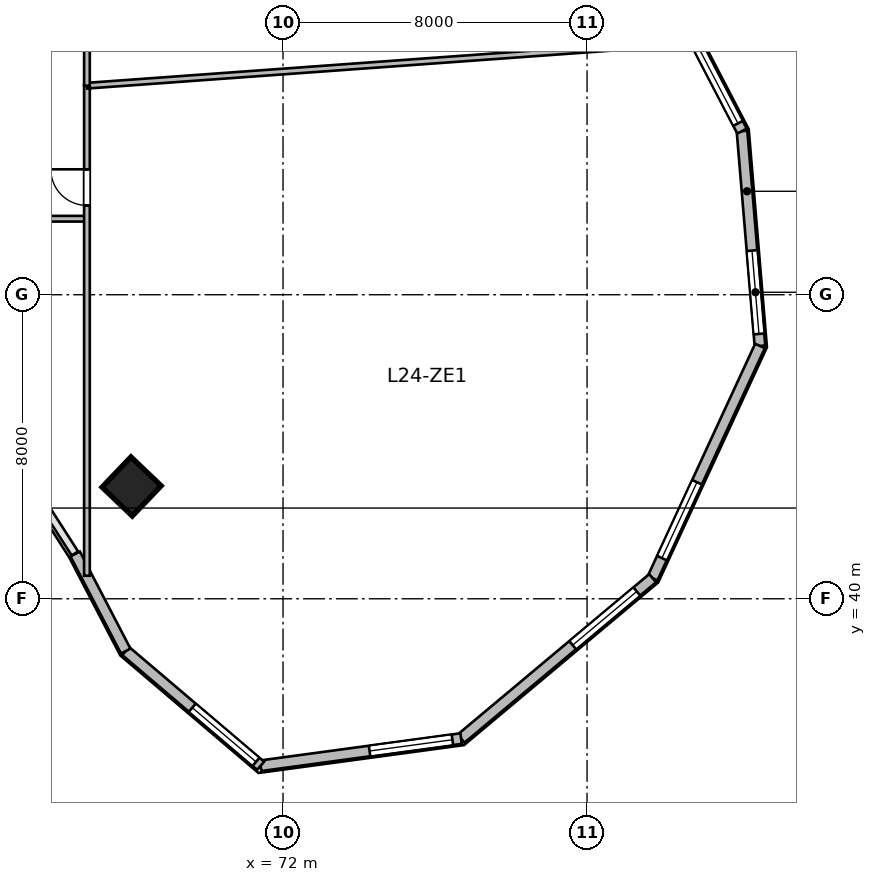
"""IFC4 building model, lengths in metres.
Left out: names, types, materials, properties, quantities, classifications, styles, units other than length and angle.
Written with IfcOpenShell. Run it as: python <this file> out.ifc"""

import sys

from ifc_helpers import new_model, si_unit, direction, frame, frame_2d, origin, origin_2d, place, context, subcontext, project, spatial, rectangle, extrude, source, transform, mapped, element, fill, save


model = new_model("IFC4")
c1 = context("Model", 3, precision=1e-05, world=origin(), true_north=direction((0.0, 1.0)))
c2 = subcontext(c1, "Body", "Model", "MODEL_VIEW")
j1 = project(units=[si_unit("LENGTHUNIT", "METRE"), si_unit("PLANEANGLEUNIT", "RADIAN")], contexts=[c1])
p1 = place(None, origin())
s1 = spatial("IfcSite", under=j1, at=p1, CompositionType="ELEMENT")
p2 = place(p1, origin())
s2 = spatial("IfcBuilding", under=s1, at=p2, CompositionType="ELEMENT")
p3 = place(p2, frame((0.0, 0.0, 103.8)))
s3 = spatial("IfcBuildingStorey", under=s2, at=p3, CompositionType="ELEMENT", Elevation=103.8)
m1 = source(origin(), c2, "Body", "SweptSolid", [
    extrude(rectangle(XDim=1.1, YDim=1.1, at=origin_2d()), origin(), (0.0, 0.0, 1.0), 3.9),
])
p4 = place(p3, frame((68.015, 42.955, 0.0), z_axis=(0.0, 0.0, 1.0), x_axis=(0.690756218984, 0.723087716626, 0.0)))
e1 = element("IfcColumn", 1, at=p4, inside=s3, PredefinedType="COLUMN", context=c2, shape_type="MappedRepresentation", body=[
    mapped(m1, transform((0.0, 0.0, 0.0), scale=1.0)),
])
m2 = source(origin(), c2, "Body", "SweptSolid", [
    extrude(rectangle(XDim=5.674, YDim=0.28, at=frame_2d((2.837, 0.0))), origin(), (0.0, 0.0, 1.0), 3.65),
])
p5 = place(p3, frame((84.078, 52.305, 0.0), z_axis=(0.0, 0.0, 1.0), x_axis=(0.083309007867, -0.996523762491, 0.0)))
e2 = element("IfcWall", 2, at=p5, inside=s3, PredefinedType="SOLIDWALL", context=c2, shape_type="MappedRepresentation", body=[
    mapped(m2, transform((0.0, 0.0, 0.0), scale=1.0)),
])
p6 = place(p5, frame((3.155, 0.0, 0.95)))
e3 = element("IfcOpeningElement", 3, at=p6, cuts=e2, PredefinedType="OPENING", context=c2, shape_type="SweptSolid", body=[
    extrude(rectangle(XDim=2.2, YDim=2.1, at=frame_2d((1.1, 1.05))), frame((0.0, 0.15, 0.0), z_axis=(0.0, -1.0, 0.0), x_axis=(1.0, 0.0, 0.0)), (0.0, 0.0, 1.0), 0.3),
])
m3 = source(origin(), c2, "Body", "SweptSolid", [
    extrude(rectangle(XDim=6.732, YDim=0.28, at=frame_2d((3.366, 0.0))), origin(), (0.0, 0.0, 1.0), 3.65),
])
p7 = place(p3, frame((84.55, 46.652, 0.0), z_axis=(0.0, 0.0, 1.0), x_axis=(-0.419644552709, -0.907688520023, 0.0)))
e4 = element("IfcWall", 4, at=p7, inside=s3, PredefinedType="SOLIDWALL", context=c2, shape_type="MappedRepresentation", body=[
    mapped(m3, transform((0.0, 0.0, 0.0), scale=1.0)),
])
p8 = place(p7, frame((3.949, 0.0, 0.95)))
e5 = element("IfcOpeningElement", 5, at=p8, cuts=e4, PredefinedType="OPENING", context=c2, shape_type="SweptSolid", body=[
    extrude(rectangle(XDim=2.2, YDim=2.1, at=frame_2d((1.1, 1.05))), frame((0.0, 0.15, 0.0), z_axis=(0.0, -1.0, 0.0), x_axis=(1.0, 0.0, 0.0)), (0.0, 0.0, 1.0), 0.3),
])
m4 = source(origin(), c2, "Body", "SweptSolid", [
    extrude(rectangle(XDim=6.573, YDim=0.28, at=frame_2d((3.287, 0.0))), origin(), (0.0, 0.0, 1.0), 3.65),
])
p9 = place(p3, frame((81.725, 40.541, 0.0), z_axis=(0.0, 0.0, 1.0), x_axis=(-0.766715154163, -0.641987439423, 0.0)))
e6 = element("IfcWall", 6, at=p9, inside=s3, PredefinedType="SOLIDWALL", context=c2, shape_type="MappedRepresentation", body=[
    mapped(m4, transform((0.0, 0.0, 0.0), scale=1.0)),
])
p10 = place(p9, frame((0.543, 0.0, 0.95)))
e7 = element("IfcOpeningElement", 7, at=p10, cuts=e6, PredefinedType="OPENING", context=c2, shape_type="SweptSolid", body=[
    extrude(rectangle(XDim=2.2, YDim=2.1, at=frame_2d((1.1, 1.05))), frame((0.0, 0.15, 0.0), z_axis=(0.0, -1.0, 0.0), x_axis=(1.0, 0.0, 0.0)), (0.0, 0.0, 1.0), 0.3),
])
m5 = source(origin(), c2, "Body", "SweptSolid", [
    extrude(rectangle(XDim=5.324, YDim=0.28, at=frame_2d((2.662, 0.0))), origin(), (0.0, 0.0, 1.0), 3.65),
])
p11 = place(p3, frame((76.686, 36.322, 0.0), z_axis=(0.0, 0.0, 1.0), x_axis=(-0.990931467223, -0.134368252451, 0.0)))
e8 = element("IfcWall", 8, at=p11, inside=s3, PredefinedType="SOLIDWALL", context=c2, shape_type="MappedRepresentation", body=[
    mapped(m5, transform((0.0, 0.0, 0.0), scale=1.0)),
])
p12 = place(p11, frame((0.231, 0.0, 0.95)))
e9 = element("IfcOpeningElement", 9, at=p12, cuts=e8, PredefinedType="OPENING", context=c2, shape_type="SweptSolid", body=[
    extrude(rectangle(XDim=2.2, YDim=2.1, at=frame_2d((1.1, 1.05))), frame((0.0, 0.15, 0.0), z_axis=(0.0, -1.0, 0.0), x_axis=(1.0, 0.0, 0.0)), (0.0, 0.0, 1.0), 0.3),
])
m6 = source(origin(), c2, "Body", "SweptSolid", [
    extrude(rectangle(XDim=4.659, YDim=0.28, at=frame_2d((2.33, 0.0))), origin(), (0.0, 0.0, 1.0), 3.65),
])
p13 = place(p3, frame((71.41, 35.606, 0.0), z_axis=(0.0, 0.0, 1.0), x_axis=(-0.761913458795, 0.647678841176, 0.0)))
e10 = element("IfcWall", 10, at=p13, inside=s3, PredefinedType="SOLIDWALL", context=c2, shape_type="MappedRepresentation", body=[
    mapped(m6, transform((0.0, 0.0, 0.0), scale=1.0)),
])
p14 = place(p13, frame((0.16, 0.0, 0.95)))
e11 = element("IfcOpeningElement", 11, at=p14, cuts=e10, PredefinedType="OPENING", context=c2, shape_type="SweptSolid", body=[
    extrude(rectangle(XDim=2.2, YDim=2.1, at=frame_2d((1.1, 1.05))), frame((0.0, 0.15, 0.0), z_axis=(0.0, -1.0, 0.0), x_axis=(1.0, 0.0, 0.0)), (0.0, 0.0, 1.0), 0.3),
])
m7 = source(origin(), c2, "Body", "SweptSolid", [
    extrude(rectangle(XDim=2.88, YDim=0.28, at=frame_2d((1.44, 0.0))), origin(), (0.0, 0.0, 1.0), 3.65),
])
p15 = place(p3, frame((67.861, 38.624, 0.0), z_axis=(0.0, 0.0, 1.0), x_axis=(-0.461769086658, 0.887000175088, 0.0)))
e12 = element("IfcWall", 12, at=p15, inside=s3, PredefinedType="SOLIDWALL", context=c2, shape_type="MappedRepresentation", body=[
    mapped(m7, transform((0.0, 0.0, 0.0), scale=1.0)),
])
m8 = source(origin(), c2, "Body", "SweptSolid", [
    extrude(rectangle(XDim=5.315, YDim=0.28, at=frame_2d((2.658, 0.0))), origin(), (0.0, 0.0, 1.0), 3.65),
])
p16 = place(p3, frame((81.623, 57.02, 0.0), z_axis=(0.0, 0.0, 1.0), x_axis=(0.461760527822, -0.887004630735, 0.0)))
e13 = element("IfcWall", 13, at=p16, inside=s3, PredefinedType="SOLIDWALL", context=c2, shape_type="MappedRepresentation", body=[
    mapped(m8, transform((0.0, 0.0, 0.0), scale=1.0)),
])
p17 = place(p16, frame((2.886, 0.0, 0.95)))
e14 = element("IfcOpeningElement", 14, at=p17, cuts=e13, PredefinedType="OPENING", context=c2, shape_type="SweptSolid", body=[
    extrude(rectangle(XDim=2.2, YDim=2.1, at=frame_2d((1.1, 1.05))), frame((0.0, 0.15, 0.0), z_axis=(0.0, -1.0, 0.0), x_axis=(1.0, 0.0, 0.0)), (0.0, 0.0, 1.0), 0.3),
])
m9 = source(origin(), c2, "Body", "SweptSolid", [
    extrude(rectangle(XDim=2.5, YDim=0.15, at=frame_2d((1.25, 0.0))), origin(), (0.0, 0.0, 1.0), 3.65),
])
p18 = place(p3, frame((64.3, 50.0, 0.0), z_axis=(0.0, 0.0, 1.0), x_axis=(1.0, 0.0, 0.0)))
e15 = element("IfcWall", 15, at=p18, inside=s3, PredefinedType="PARTITIONING", context=c2, shape_type="MappedRepresentation", body=[
    mapped(m9, transform((0.0, 0.0, 0.0), scale=1.0)),
])
m10 = source(origin(), c2, "Body", "SweptSolid", [
    extrude(rectangle(XDim=12.894, YDim=0.15, at=frame_2d((6.447, 0.0))), origin(), (0.0, 0.0, 1.0), 2.942),
])
p19 = place(p3, frame((66.84, 40.606, 0.0), z_axis=(0.0, 0.0, 1.0), x_axis=(0.0, 1.0, 0.0)))
e16 = element("IfcWall", 16, at=p19, inside=s3, PredefinedType="PARTITIONING", context=c2, shape_type="MappedRepresentation", body=[
    mapped(m10, transform((0.0, 0.0, 0.0), scale=1.0)),
])
p20 = place(p19, frame((9.744, 0.0, 0.0)))
e17 = element("IfcOpeningElement", 17, at=p20, cuts=e16, PredefinedType="OPENING", context=c2, shape_type="SweptSolid", body=[
    extrude(rectangle(XDim=0.95, YDim=2.1, at=frame_2d((0.475, 1.05))), frame((0.0, 0.085, 0.0), z_axis=(0.0, -1.0, 0.0), x_axis=(1.0, 0.0, 0.0)), (0.0, 0.0, 1.0), 0.17),
])
m11 = source(origin(), c2, "Body", "SweptSolid", [
    extrude(rectangle(XDim=15.924, YDim=0.15, at=frame_2d((7.962, 0.0))), origin(), (0.0, 0.0, 1.0), 3.65),
])
p21 = place(p3, frame((66.84, 53.5, 0.0), z_axis=(0.0, 0.0, 1.0), x_axis=(0.997397082693, 0.072104503572, 0.0)))
e18 = element("IfcWall", 18, at=p21, inside=s3, PredefinedType="PARTITIONING", context=c2, shape_type="MappedRepresentation", body=[
    mapped(m11, transform((0.0, 0.0, 0.0), scale=1.0)),
])
m12 = source(origin(), c2, "Body", "SweptSolid", [
    extrude(rectangle(XDim=5.5, YDim=0.15, at=frame_2d((2.75, 0.0))), origin(), (0.0, 0.0, 1.0), 3.022),
])
p22 = place(p3, frame((66.84, 53.5, 0.0), z_axis=(0.0, 0.0, 1.0), x_axis=(0.0, 1.0, 0.0)))
e19 = element("IfcWall", 19, at=p22, inside=s3, PredefinedType="PARTITIONING", context=c2, shape_type="MappedRepresentation", body=[
    mapped(m12, transform((0.0, 0.0, 0.0), scale=1.0)),
])
p23 = place(p22, frame((2.275, 0.0, 0.0)))
e20 = element("IfcOpeningElement", 20, at=p23, cuts=e19, PredefinedType="OPENING", context=c2, shape_type="SweptSolid", body=[
    extrude(rectangle(XDim=0.95, YDim=2.1, at=frame_2d((0.475, 1.05))), frame((0.0, 0.085, 0.0), z_axis=(0.0, -1.0, 0.0), x_axis=(1.0, 0.0, 0.0)), (0.0, 0.0, 1.0), 0.17),
])
m13 = source(origin(), c2, "Body", "SweptSolid", [
    extrude(rectangle(XDim=2.2, YDim=2.1, at=frame_2d((1.1, 1.05))), frame((0.0, 0.03, 0.0), z_axis=(0.0, -1.0, 0.0), x_axis=(1.0, 0.0, 0.0)), (0.0, 0.0, 1.0), 0.06),
])
p24 = place(p6, origin())
e21 = element("IfcWindow", 21, at=p24, inside=s3, PartitioningType="TRIPLE_PANEL_VERTICAL", PredefinedType="WINDOW", context=c2, shape_type="MappedRepresentation", body=[
    mapped(m13, transform((0.0, 0.0, 0.0), scale=1.0)),
])
fill(e3, e21)
p25 = place(p8, origin())
e22 = element("IfcWindow", 22, at=p25, inside=s3, PartitioningType="TRIPLE_PANEL_VERTICAL", PredefinedType="WINDOW", context=c2, shape_type="MappedRepresentation", body=[
    mapped(m13, transform((0.0, 0.0, 0.0), scale=1.0)),
])
fill(e5, e22)
p26 = place(p10, origin())
e23 = element("IfcWindow", 23, at=p26, inside=s3, PartitioningType="TRIPLE_PANEL_VERTICAL", PredefinedType="WINDOW", context=c2, shape_type="MappedRepresentation", body=[
    mapped(m13, transform((0.0, 0.0, 0.0), scale=1.0)),
])
fill(e7, e23)
p27 = place(p12, origin())
e24 = element("IfcWindow", 24, at=p27, inside=s3, PartitioningType="TRIPLE_PANEL_VERTICAL", PredefinedType="WINDOW", context=c2, shape_type="MappedRepresentation", body=[
    mapped(m13, transform((0.0, 0.0, 0.0), scale=1.0)),
])
fill(e9, e24)
p28 = place(p14, origin())
e25 = element("IfcWindow", 25, at=p28, inside=s3, PartitioningType="TRIPLE_PANEL_VERTICAL", PredefinedType="WINDOW", context=c2, shape_type="MappedRepresentation", body=[
    mapped(m13, transform((0.0, 0.0, 0.0), scale=1.0)),
])
fill(e11, e25)
p29 = place(p17, origin())
e26 = element("IfcWindow", 26, at=p29, inside=s3, PartitioningType="TRIPLE_PANEL_VERTICAL", PredefinedType="WINDOW", context=c2, shape_type="MappedRepresentation", body=[
    mapped(m13, transform((0.0, 0.0, 0.0), scale=1.0)),
])
fill(e14, e26)
m14 = source(origin(), c2, "Body", "SweptSolid", [
    extrude(rectangle(XDim=0.95, YDim=2.1, at=frame_2d((0.475, 1.05))), frame((0.0, 0.025, 0.0), z_axis=(0.0, -1.0, 0.0), x_axis=(1.0, 0.0, 0.0)), (0.0, 0.0, 1.0), 0.05),
])
p30 = place(p20, origin())
e27 = element("IfcDoor", 27, at=p30, inside=s3, OperationType="SINGLE_SWING_RIGHT", PredefinedType="DOOR", context=c2, shape_type="MappedRepresentation", body=[
    mapped(m14, transform((0.0, 0.0, 0.0), scale=1.0)),
])
fill(e17, e27)
save(model, sys.argv[1])
